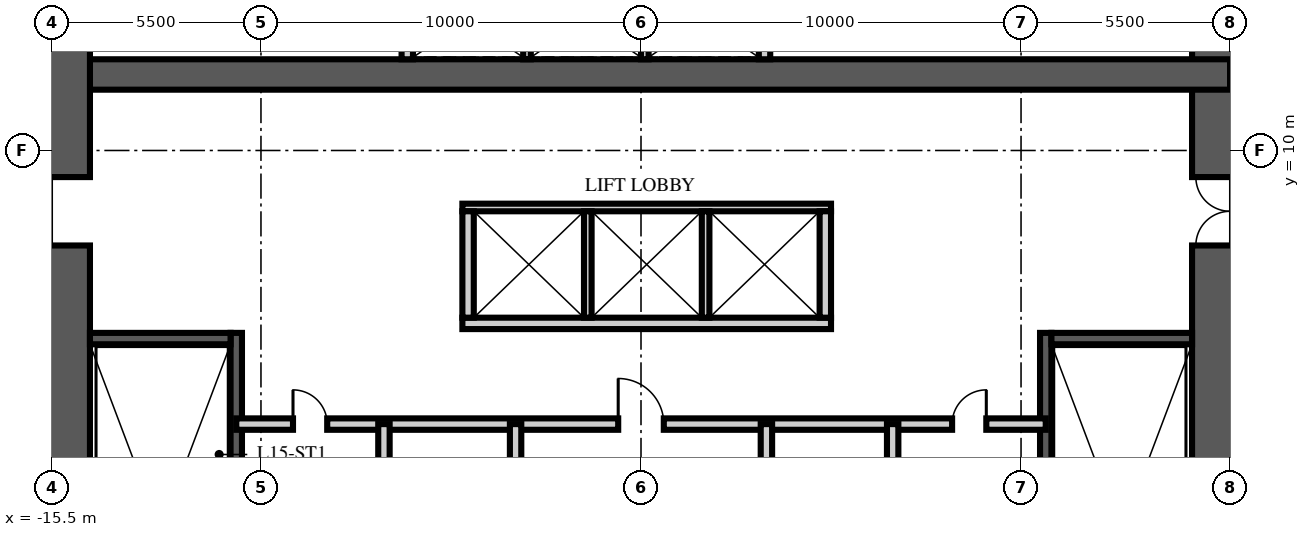
"""IFC4 building model, lengths in metres.
Left out: names, types, materials, properties, quantities, classifications, styles, units other than length and angle.
Written with IfcOpenShell. Run it as: python <this file> out.ifc"""

import sys

from ifc_helpers import new_model, si_unit, direction, frame, frame_2d, origin, place, context, subcontext, project, spatial, rectangle, extrude, element, fill, save


model = new_model("IFC4")
c1 = context("Model", 3, precision=1e-05, world=origin(), true_north=direction((0.0, 1.0)))
c2 = subcontext(c1, "Body", "Model", "MODEL_VIEW")
j1 = project(units=[si_unit("LENGTHUNIT", "METRE"), si_unit("PLANEANGLEUNIT", "RADIAN")], contexts=[c1])
p1 = place(None, origin())
s1 = spatial("IfcSite", under=j1, at=p1, CompositionType="ELEMENT")
p2 = place(p1, origin())
s2 = spatial("IfcBuilding", under=s1, at=p2, CompositionType="ELEMENT")
p3 = place(p2, frame((0.0, 0.0, 62.25)))
s3 = spatial("IfcBuildingStorey", under=s2, at=p3, CompositionType="ELEMENT", Elevation=62.25)
p4 = place(p3, frame((15.5, -15.5, -0.25), z_axis=(0.0, 0.0, 1.0), x_axis=(0.0, 1.0, 0.0)))
e1 = element("IfcWall", 1, at=p4, inside=s3, PredefinedType="SHEAR", context=c2, shape_type="SweptSolid", body=[
    extrude(rectangle(XDim=31.0, YDim=2.0, at=frame_2d((15.5, 0.0))), origin(), (0.0, 0.0, 1.0), 3.75),
])
p5 = place(p4, frame((6.5, 0.0, 0.25)))
e2 = element("IfcOpeningElement", 2, at=p5, cuts=e1, PredefinedType="OPENING", context=c2, shape_type="SweptSolid", body=[
    extrude(rectangle(XDim=1.2, YDim=2.1, at=frame_2d((0.6, 1.05))), frame((0.0, 1.01, 0.0), z_axis=(0.0, -1.0, 0.0), x_axis=(1.0, 0.0, 0.0)), (0.0, 0.0, 1.0), 2.02),
])
p6 = place(p4, frame((23.0, 0.0, 0.25)))
e3 = element("IfcOpeningElement", 3, at=p6, cuts=e1, PredefinedType="OPENING", context=c2, shape_type="SweptSolid", body=[
    extrude(rectangle(XDim=1.8, YDim=2.1, at=frame_2d((0.9, 1.05))), frame((0.0, 1.01, 0.0), z_axis=(0.0, -1.0, 0.0), x_axis=(1.0, 0.0, 0.0)), (0.0, 0.0, 1.0), 2.02),
])
p7 = place(p3, frame((-15.5, 12.0, -0.25), z_axis=(0.0, 0.0, 1.0), x_axis=(1.0, 0.0, 0.0)))
e4 = element("IfcWall", 4, at=p7, inside=s3, PredefinedType="SHEAR", context=c2, shape_type="SweptSolid", body=[
    extrude(rectangle(XDim=31.0, YDim=0.8, at=frame_2d((15.5, 0.0))), origin(), (0.0, 0.0, 1.0), 3.75),
])
p8 = place(p3, frame((-15.5, -15.5, -0.25), z_axis=(0.0, 0.0, 1.0), x_axis=(0.0, 1.0, 0.0)))
e5 = element("IfcWall", 5, at=p8, inside=s3, PredefinedType="SHEAR", context=c2, shape_type="SweptSolid", body=[
    extrude(rectangle(XDim=31.0, YDim=2.0, at=frame_2d((15.5, 0.0))), origin(), (0.0, 0.0, 1.0), 3.75),
])
p9 = place(p8, frame((6.5, 0.0, 0.25)))
e6 = element("IfcOpeningElement", 6, at=p9, cuts=e5, PredefinedType="OPENING", context=c2, shape_type="SweptSolid", body=[
    extrude(rectangle(XDim=1.2, YDim=2.1, at=frame_2d((0.6, 1.05))), frame((0.0, 1.01, 0.0), z_axis=(0.0, -1.0, 0.0), x_axis=(1.0, 0.0, 0.0)), (0.0, 0.0, 1.0), 2.02),
])
p10 = place(p8, frame((23.0, 0.0, 0.25)))
e7 = element("IfcOpeningElement", 7, at=p10, cuts=e5, PredefinedType="OPENING", context=c2, shape_type="SweptSolid", body=[
    extrude(rectangle(XDim=1.8, YDim=2.1, at=frame_2d((0.9, 1.05))), frame((0.0, 1.01, 0.0), z_axis=(0.0, -1.0, 0.0), x_axis=(1.0, 0.0, 0.0)), (0.0, 0.0, 1.0), 2.02),
])
p11 = place(p3, frame((-10.65, -4.9, 0.0), z_axis=(0.0, 0.0, 1.0), x_axis=(0.0, 1.0, 0.0)))
e8 = element("IfcWall", 8, at=p11, inside=s3, PredefinedType="SOLIDWALL", context=c2, shape_type="SweptSolid", body=[
    extrude(rectangle(XDim=10.1, YDim=0.3, at=frame_2d((5.05, 0.0))), origin(), (0.0, 0.0, 1.0), 3.5),
])
p12 = place(p3, frame((-14.5, 5.05, 0.0), z_axis=(0.0, 0.0, 1.0), x_axis=(1.0, 0.0, 0.0)))
e9 = element("IfcWall", 9, at=p12, inside=s3, PredefinedType="SOLIDWALL", context=c2, shape_type="SweptSolid", body=[
    extrude(rectangle(XDim=3.7, YDim=0.3, at=frame_2d((1.85, 0.0))), origin(), (0.0, 0.0, 1.0), 3.5),
])
p13 = place(p3, frame((10.65, -4.9, 0.0), z_axis=(0.0, 0.0, 1.0), x_axis=(0.0, 1.0, 0.0)))
e10 = element("IfcWall", 10, at=p13, inside=s3, PredefinedType="SOLIDWALL", context=c2, shape_type="SweptSolid", body=[
    extrude(rectangle(XDim=10.1, YDim=0.3, at=frame_2d((5.05, 0.0))), origin(), (0.0, 0.0, 1.0), 3.5),
])
p14 = place(p3, frame((14.5, 5.05, 0.0), z_axis=(0.0, 0.0, 1.0), x_axis=(-1.0, 0.0, 0.0)))
e11 = element("IfcWall", 11, at=p14, inside=s3, PredefinedType="SOLIDWALL", context=c2, shape_type="SweptSolid", body=[
    extrude(rectangle(XDim=3.7, YDim=0.3, at=frame_2d((1.85, 0.0))), origin(), (0.0, 0.0, 1.0), 3.5),
])
p15 = place(p3, frame((-4.7, 5.45, 0.0), z_axis=(0.0, 0.0, 1.0), x_axis=(1.0, 0.0, 0.0)))
e12 = element("IfcWall", 12, at=p15, inside=s3, PredefinedType="PARTITIONING", context=c2, shape_type="SweptSolid", body=[
    extrude(rectangle(XDim=9.7, YDim=0.3, at=frame_2d((4.85, 0.0))), origin(), (0.0, 0.0, 1.0), 3.5),
])
p16 = place(p3, frame((-4.7, 8.5, 0.0), z_axis=(0.0, 0.0, 1.0), x_axis=(1.0, 0.0, 0.0)))
e13 = element("IfcWall", 13, at=p16, inside=s3, PredefinedType="PARTITIONING", context=c2, shape_type="SweptSolid", body=[
    extrude(rectangle(XDim=9.7, YDim=0.2, at=frame_2d((4.85, 0.0))), origin(), (0.0, 0.0, 1.0), 3.5),
])
for number, where, z_axis, x_axis in (
    (14, (-4.55, 5.6, 0.0), (0.0, 0.0, 1.0), (0.0, 1.0, 0.0)),
    (15, (4.85, 5.6, 0.0), (0.0, 0.0, 1.0), (0.0, 1.0, 0.0)),
):
    element("IfcWall", number, at=place(p3, frame(where, z_axis=z_axis, x_axis=x_axis)), inside=s3, PredefinedType="PARTITIONING", context=c2, shape_type="SweptSolid", body=[
        extrude(rectangle(XDim=2.8, YDim=0.3, at=frame_2d((1.4, 0.0))), origin(), (0.0, 0.0, 1.0), 3.5),
    ])
for number, where, z_axis, x_axis in (
    (16, (-1.4, 5.6, 0.0), (0.0, 0.0, 1.0), (0.0, 1.0, 0.0)),
    (17, (1.7, 5.6, 0.0), (0.0, 0.0, 1.0), (0.0, 1.0, 0.0)),
):
    element("IfcWall", number, at=place(p3, frame(where, z_axis=z_axis, x_axis=x_axis)), inside=s3, PredefinedType="PARTITIONING", context=c2, shape_type="SweptSolid", body=[
        extrude(rectangle(XDim=2.8, YDim=0.2, at=frame_2d((1.4, 0.0))), origin(), (0.0, 0.0, 1.0), 3.5),
    ])
for number, where, z_axis, x_axis in (
    (18, (-6.15, 12.4, 0.0), (0.0, 0.0, 1.0), (0.0, 1.0, 0.0)),
    (19, (3.25, 12.4, 0.0), (0.0, 0.0, 1.0), (0.0, 1.0, 0.0)),
):
    element("IfcWall", number, at=place(p3, frame(where, z_axis=z_axis, x_axis=x_axis)), inside=s3, PredefinedType="PARTITIONING", context=c2, shape_type="SweptSolid", body=[
        extrude(rectangle(XDim=2.1, YDim=0.3, at=frame_2d((1.05, 0.0))), origin(), (0.0, 0.0, 1.0), 3.5),
    ])
for number, where, z_axis, x_axis in (
    (20, (-3.0, 12.4, 0.0), (0.0, 0.0, 1.0), (0.0, 1.0, 0.0)),
    (21, (0.1, 12.4, 0.0), (0.0, 0.0, 1.0), (0.0, 1.0, 0.0)),
):
    element("IfcWall", number, at=place(p3, frame(where, z_axis=z_axis, x_axis=x_axis)), inside=s3, PredefinedType="PARTITIONING", context=c2, shape_type="SweptSolid", body=[
        extrude(rectangle(XDim=2.1, YDim=0.2, at=frame_2d((1.05, 0.0))), origin(), (0.0, 0.0, 1.0), 3.5),
    ])
p17 = place(p3, frame((-10.65, 2.8, 0.0), z_axis=(0.0, 0.0, 1.0), x_axis=(1.0, 0.0, 0.0)))
e22 = element("IfcWall", 22, at=p17, inside=s3, PredefinedType="PARTITIONING", context=c2, shape_type="SweptSolid", body=[
    extrude(rectangle(XDim=21.3, YDim=0.3, at=frame_2d((10.65, 0.0))), origin(), (0.0, 0.0, 1.0), 3.5),
])
p18 = place(p17, frame((10.05, 0.0, 0.0)))
e23 = element("IfcOpeningElement", 23, at=p18, cuts=e22, PredefinedType="OPENING", context=c2, shape_type="SweptSolid", body=[
    extrude(rectangle(XDim=1.2, YDim=2.1, at=frame_2d((0.6, 1.05))), frame((0.0, 0.16, 0.0), z_axis=(0.0, -1.0, 0.0), x_axis=(1.0, 0.0, 0.0)), (0.0, 0.0, 1.0), 0.32),
])
p19 = place(p17, frame((1.493, 0.0, 0.0)))
e24 = element("IfcOpeningElement", 24, at=p19, cuts=e22, PredefinedType="OPENING", context=c2, shape_type="SweptSolid", body=[
    extrude(rectangle(XDim=0.9, YDim=2.1, at=frame_2d((0.45, 1.05))), frame((0.0, 0.16, 0.0), z_axis=(0.0, -1.0, 0.0), x_axis=(1.0, 0.0, 0.0)), (0.0, 0.0, 1.0), 0.32),
])
p20 = place(p17, frame((18.836, 0.0, 0.0)))
e25 = element("IfcOpeningElement", 25, at=p20, cuts=e22, PredefinedType="OPENING", context=c2, shape_type="SweptSolid", body=[
    extrude(rectangle(XDim=0.9, YDim=2.1, at=frame_2d((0.45, 1.05))), frame((0.0, 0.16, 0.0), z_axis=(0.0, -1.0, 0.0), x_axis=(1.0, 0.0, 0.0)), (0.0, 0.0, 1.0), 0.32),
])
p21 = place(p3, frame((-3.3, -6.65, 0.0), z_axis=(0.0, 0.0, 1.0), x_axis=(0.0, 1.0, 0.0)))
e26 = element("IfcWall", 26, at=p21, inside=s3, PredefinedType="PARTITIONING", context=c2, shape_type="SweptSolid", body=[
    extrude(rectangle(XDim=9.45, YDim=0.3, at=frame_2d((4.725, 0.0))), origin(), (0.0, 0.0, 1.0), 3.5),
])
p22 = place(p21, frame((4.275, 0.0, 0.0)))
e27 = element("IfcOpeningElement", 27, at=p22, cuts=e26, PredefinedType="OPENING", context=c2, shape_type="SweptSolid", body=[
    extrude(rectangle(XDim=0.9, YDim=2.1, at=frame_2d((0.45, 1.05))), frame((0.0, 0.16, 0.0), z_axis=(0.0, -1.0, 0.0), x_axis=(1.0, 0.0, 0.0)), (0.0, 0.0, 1.0), 0.32),
])
p23 = place(p3, frame((3.3, -6.65, 0.0), z_axis=(0.0, 0.0, 1.0), x_axis=(0.0, 1.0, 0.0)))
e28 = element("IfcWall", 28, at=p23, inside=s3, PredefinedType="PARTITIONING", context=c2, shape_type="SweptSolid", body=[
    extrude(rectangle(XDim=9.45, YDim=0.3, at=frame_2d((4.725, 0.0))), origin(), (0.0, 0.0, 1.0), 3.5),
])
p24 = place(p23, frame((4.275, 0.0, 0.0)))
e29 = element("IfcOpeningElement", 29, at=p24, cuts=e28, PredefinedType="OPENING", context=c2, shape_type="SweptSolid", body=[
    extrude(rectangle(XDim=0.9, YDim=2.1, at=frame_2d((0.45, 1.05))), frame((0.0, 0.16, 0.0), z_axis=(0.0, -1.0, 0.0), x_axis=(1.0, 0.0, 0.0)), (0.0, 0.0, 1.0), 0.32),
])
for number, where, z_axis, x_axis in (
    (30, (-6.764, -6.65, 0.0), (0.0, 0.0, 1.0), (0.0, 1.0, 0.0)),
    (31, (6.622, -6.65, 0.0), (0.0, 0.0, 1.0), (0.0, 1.0, 0.0)),
):
    element("IfcWall", number, at=place(p3, frame(where, z_axis=z_axis, x_axis=x_axis)), inside=s3, PredefinedType="PARTITIONING", context=c2, shape_type="SweptSolid", body=[
        extrude(rectangle(XDim=9.45, YDim=0.3, at=frame_2d((4.725, 0.0))), origin(), (0.0, 0.0, 1.0), 3.5),
    ])
p25 = place(p10, origin())
e32 = element("IfcDoor", 32, at=p25, inside=s3, OperationType="DOUBLE_DOOR_SINGLE_SWING", PredefinedType="DOOR", context=c2, shape_type="SweptSolid", body=[
    extrude(rectangle(XDim=1.8, YDim=2.1, at=frame_2d((0.9, 1.05))), frame((0.0, 0.025, 0.0), z_axis=(0.0, -1.0, 0.0), x_axis=(1.0, 0.0, 0.0)), (0.0, 0.0, 1.0), 0.05),
])
fill(e7, e32)
p26 = place(p6, origin())
e33 = element("IfcDoor", 33, at=p26, inside=s3, OperationType="DOUBLE_DOOR_SINGLE_SWING", PredefinedType="DOOR", context=c2, shape_type="SweptSolid", body=[
    extrude(rectangle(XDim=1.8, YDim=2.1, at=frame_2d((0.9, 1.05))), frame((0.0, 0.025, 0.0), z_axis=(0.0, -1.0, 0.0), x_axis=(1.0, 0.0, 0.0)), (0.0, 0.0, 1.0), 0.05),
])
fill(e3, e33)
p27 = place(p18, origin())
e34 = element("IfcDoor", 34, at=p27, inside=s3, OperationType="SINGLE_SWING_LEFT", PredefinedType="DOOR", context=c2, shape_type="SweptSolid", body=[
    extrude(rectangle(XDim=1.2, YDim=2.1, at=frame_2d((0.6, 1.05))), frame((0.0, 0.025, 0.0), z_axis=(0.0, -1.0, 0.0), x_axis=(1.0, 0.0, 0.0)), (0.0, 0.0, 1.0), 0.05),
])
fill(e23, e34)
p28 = place(p19, origin())
e35 = element("IfcDoor", 35, at=p28, inside=s3, OperationType="SINGLE_SWING_LEFT", PredefinedType="DOOR", context=c2, shape_type="SweptSolid", body=[
    extrude(rectangle(XDim=0.9, YDim=2.1, at=frame_2d((0.45, 1.05))), frame((0.0, 0.025, 0.0), z_axis=(0.0, -1.0, 0.0), x_axis=(1.0, 0.0, 0.0)), (0.0, 0.0, 1.0), 0.05),
])
fill(e24, e35)
p29 = place(p20, origin())
e36 = element("IfcDoor", 36, at=p29, inside=s3, OperationType="SINGLE_SWING_RIGHT", PredefinedType="DOOR", context=c2, shape_type="SweptSolid", body=[
    extrude(rectangle(XDim=0.9, YDim=2.1, at=frame_2d((0.45, 1.05))), frame((0.0, 0.025, 0.0), z_axis=(0.0, -1.0, 0.0), x_axis=(1.0, 0.0, 0.0)), (0.0, 0.0, 1.0), 0.05),
])
fill(e25, e36)
save(model, sys.argv[1])
